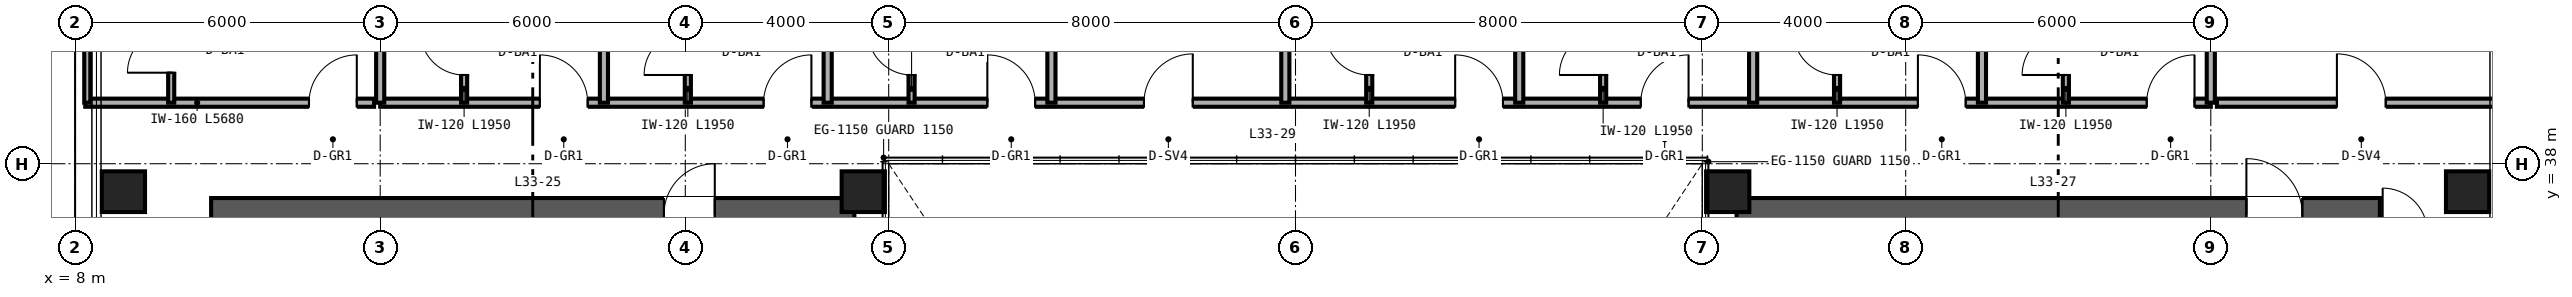
"""IFC4 building model, lengths in metres.
Left out: names, types, materials, properties, quantities, classifications, styles, units other than length and angle.
Written with IfcOpenShell. Run it as: python <this file> out.ifc"""

import sys

from ifc_helpers import new_model, si_unit, direction, frame, frame_2d, origin, origin_2d, place, context, subcontext, project, spatial, rectangle, hollow_rectangle, extrude, source, transform, mapped, element, fill, save


model = new_model("IFC4")
c1 = context("Model", 3, precision=1e-05, world=origin(), true_north=direction((0.0, 1.0)))
c2 = subcontext(c1, "Body", "Model", "MODEL_VIEW")
j1 = project(units=[si_unit("LENGTHUNIT", "METRE"), si_unit("PLANEANGLEUNIT", "RADIAN")], contexts=[c1])
p1 = place(None, origin())
s1 = spatial("IfcSite", under=j1, at=p1, CompositionType="ELEMENT")
p2 = place(p1, origin())
s2 = spatial("IfcBuilding", under=s1, at=p2, CompositionType="ELEMENT")
p3 = place(p2, frame((0.0, 0.0, 133.2)))
s3 = spatial("IfcBuildingStorey", under=s2, at=p3, CompositionType="ELEMENT", Elevation=133.2)
p4 = place(p3, frame((10.675, 37.0, 0.0), z_axis=(0.0, 0.0, 1.0), x_axis=(1.0, 0.0, 0.0)))
e1 = element("IfcWall", 1, at=p4, inside=s3, PredefinedType="SHEAR", context=c2, shape_type="SweptSolid", body=[
    extrude(rectangle(XDim=12.65, YDim=0.65, at=frame_2d((6.325, 0.0))), origin(), (0.0, 0.0, 1.0), 3.36),
])
p5 = place(p4, frame((8.905, 0.0, 0.0)))
e2 = element("IfcOpeningElement", 2, at=p5, cuts=e1, PredefinedType="OPENING", context=c2, shape_type="SweptSolid", body=[
    extrude(rectangle(XDim=1.0, YDim=2.15, at=frame_2d((0.5, 1.075))), frame((0.0, 0.335, 0.0), z_axis=(0.0, -1.0, 0.0), x_axis=(1.0, 0.0, 0.0)), (0.0, 0.0, 1.0), 0.67),
])
p6 = place(p3, frame((40.675, 37.0, 0.0), z_axis=(0.0, 0.0, 1.0), x_axis=(1.0, 0.0, 0.0)))
e3 = element("IfcWall", 3, at=p6, inside=s3, PredefinedType="SHEAR", context=c2, shape_type="SweptSolid", body=[
    extrude(rectangle(XDim=12.65, YDim=0.65, at=frame_2d((6.325, 0.0))), origin(), (0.0, 0.0, 1.0), 3.36),
])
p7 = place(p6, frame((10.025, 0.0, 0.0)))
e4 = element("IfcOpeningElement", 4, at=p7, cuts=e3, PredefinedType="OPENING", context=c2, shape_type="SweptSolid", body=[
    extrude(rectangle(XDim=1.1, YDim=2.15, at=frame_2d((0.55, 1.075))), frame((0.0, 0.335, 0.0), z_axis=(0.0, -1.0, 0.0), x_axis=(1.0, 0.0, 0.0)), (0.0, 0.0, 1.0), 0.67),
])
m1 = source(origin(), c2, "Body", "SweptSolid", [
    extrude(hollow_rectangle(XDim=0.85, YDim=0.8, WallThickness=0.032, at=origin_2d()), origin(), (0.0, 0.0, 1.0), 3.36),
])
for number, where, z_axis, x_axis in (
    (5, (8.95, 37.45, 0.0), (0.0, 0.0, 1.0), (1.0, 0.0, 0.0)),
    (6, (23.5, 37.45, 0.0), (0.0, 0.0, 1.0), (1.0, 0.0, 0.0)),
    (7, (40.5, 37.45, 0.0), (0.0, 0.0, 1.0), (1.0, 0.0, 0.0)),
    (8, (55.05, 37.45, 0.0), (0.0, 0.0, 1.0), (1.0, 0.0, 0.0)),
):
    element("IfcColumn", number, at=place(p3, frame(where, z_axis=z_axis, x_axis=x_axis)), inside=s3, PredefinedType="COLUMN", context=c2, shape_type="MappedRepresentation", body=[
        mapped(m1, transform((0.0, 0.0, 0.0), scale=1.0)),
    ])
p8 = place(p3, frame((8.2, 39.2, 0.0), z_axis=(0.0, 0.0, 1.0), x_axis=(1.0, 0.0, 0.0)))
e9 = element("IfcWall", 9, at=p8, inside=s3, PredefinedType="PARTITIONING", context=c2, shape_type="SweptSolid", body=[
    extrude(rectangle(XDim=5.68, YDim=0.16, at=frame_2d((2.84, 0.0))), origin(), (0.0, 0.0, 1.0), 3.36),
])
p9 = place(p8, frame((4.4, 0.0, 0.0)))
e10 = element("IfcOpeningElement", 10, at=p9, cuts=e9, PredefinedType="OPENING", context=c2, shape_type="SweptSolid", body=[
    extrude(rectangle(XDim=0.94, YDim=2.15, at=frame_2d((0.47, 1.075))), frame((0.0, 0.09, 0.0), z_axis=(0.0, -1.0, 0.0), x_axis=(1.0, 0.0, 0.0)), (0.0, 0.0, 1.0), 0.18),
])
p10 = place(p3, frame((9.89, 39.2, 0.0), z_axis=(0.0, 0.0, 1.0), x_axis=(0.0, 1.0, 0.0)))
e11 = element("IfcWall", 11, at=p10, inside=s3, PredefinedType="PARTITIONING", context=c2, shape_type="SweptSolid", body=[
    extrude(rectangle(XDim=2.04, YDim=0.12, at=frame_2d((1.02, 0.0))), origin(), (0.0, 0.0, 1.0), 3.36),
])
p11 = place(p10, frame((0.59, 0.0, 0.0)))
e12 = element("IfcOpeningElement", 12, at=p11, cuts=e11, PredefinedType="OPENING", context=c2, shape_type="SweptSolid", body=[
    extrude(rectangle(XDim=0.86, YDim=2.1, at=frame_2d((0.43, 1.05))), frame((0.0, 0.07, 0.0), z_axis=(0.0, -1.0, 0.0), x_axis=(1.0, 0.0, 0.0)), (0.0, 0.0, 1.0), 0.14),
])
p12 = place(p3, frame((8.24, 39.2, 0.0), z_axis=(0.0, 0.0, 1.0), x_axis=(0.0, 1.0, 0.0)))
e13 = element("IfcWall", 13, at=p12, inside=s3, PredefinedType="PARTITIONING", context=c2, shape_type="SweptSolid", body=[
    extrude(rectangle(XDim=2.04, YDim=0.12, at=frame_2d((1.02, 0.0))), origin(), (0.0, 0.0, 1.0), 3.36),
])
p13 = place(p3, frame((50.12, 39.2, 0.0), z_axis=(0.0, 0.0, 1.0), x_axis=(1.0, 0.0, 0.0)))
e14 = element("IfcWall", 14, at=p13, inside=s3, PredefinedType="PARTITIONING", context=c2, shape_type="SweptSolid", body=[
    extrude(rectangle(XDim=5.68, YDim=0.16, at=frame_2d((2.84, 0.0))), origin(), (0.0, 0.0, 1.0), 3.36),
])
p14 = place(p13, frame((2.36, 0.0, 0.0)))
e15 = element("IfcOpeningElement", 15, at=p14, cuts=e14, PredefinedType="OPENING", context=c2, shape_type="SweptSolid", body=[
    extrude(rectangle(XDim=0.96, YDim=2.15, at=frame_2d((0.48, 1.075))), frame((0.0, 0.09, 0.0), z_axis=(0.0, -1.0, 0.0), x_axis=(1.0, 0.0, 0.0)), (0.0, 0.0, 1.0), 0.18),
])
p15 = place(p3, frame((14.0, 39.2, 0.0), z_axis=(0.0, 0.0, 1.0), x_axis=(1.0, 0.0, 0.0)))
e16 = element("IfcWall", 16, at=p15, inside=s3, PredefinedType="PARTITIONING", context=c2, shape_type="SweptSolid", body=[
    extrude(rectangle(XDim=36.0, YDim=0.16, at=frame_2d((18.0, 0.0))), origin(), (0.0, 0.0, 1.0), 2.581),
])
p16 = place(p15, frame((3.14, 0.0, 0.0)))
e17 = element("IfcOpeningElement", 17, at=p16, cuts=e16, PredefinedType="OPENING", context=c2, shape_type="SweptSolid", body=[
    extrude(rectangle(XDim=0.94, YDim=2.15, at=frame_2d((0.47, 1.075))), frame((0.0, 0.09, 0.0), z_axis=(0.0, -1.0, 0.0), x_axis=(1.0, 0.0, 0.0)), (0.0, 0.0, 1.0), 0.18),
])
p17 = place(p15, frame((7.54, 0.0, 0.0)))
e18 = element("IfcOpeningElement", 18, at=p17, cuts=e16, PredefinedType="OPENING", context=c2, shape_type="SweptSolid", body=[
    extrude(rectangle(XDim=0.94, YDim=2.15, at=frame_2d((0.47, 1.075))), frame((0.0, 0.09, 0.0), z_axis=(0.0, -1.0, 0.0), x_axis=(1.0, 0.0, 0.0)), (0.0, 0.0, 1.0), 0.18),
])
p18 = place(p15, frame((11.94, 0.0, 0.0)))
e19 = element("IfcOpeningElement", 19, at=p18, cuts=e16, PredefinedType="OPENING", context=c2, shape_type="SweptSolid", body=[
    extrude(rectangle(XDim=0.94, YDim=2.15, at=frame_2d((0.47, 1.075))), frame((0.0, 0.09, 0.0), z_axis=(0.0, -1.0, 0.0), x_axis=(1.0, 0.0, 0.0)), (0.0, 0.0, 1.0), 0.18),
])
p19 = place(p15, frame((15.02, 0.0, 0.0)))
e20 = element("IfcOpeningElement", 20, at=p19, cuts=e16, PredefinedType="OPENING", context=c2, shape_type="SweptSolid", body=[
    extrude(rectangle(XDim=0.96, YDim=2.15, at=frame_2d((0.48, 1.075))), frame((0.0, 0.09, 0.0), z_axis=(0.0, -1.0, 0.0), x_axis=(1.0, 0.0, 0.0)), (0.0, 0.0, 1.0), 0.18),
])
p20 = place(p15, frame((21.14, 0.0, 0.0)))
e21 = element("IfcOpeningElement", 21, at=p20, cuts=e16, PredefinedType="OPENING", context=c2, shape_type="SweptSolid", body=[
    extrude(rectangle(XDim=0.94, YDim=2.15, at=frame_2d((0.47, 1.075))), frame((0.0, 0.09, 0.0), z_axis=(0.0, -1.0, 0.0), x_axis=(1.0, 0.0, 0.0)), (0.0, 0.0, 1.0), 0.18),
])
p21 = place(p15, frame((24.79, 0.0, 0.0)))
e22 = element("IfcOpeningElement", 22, at=p21, cuts=e16, PredefinedType="OPENING", context=c2, shape_type="SweptSolid", body=[
    extrude(rectangle(XDim=0.94, YDim=2.15, at=frame_2d((0.47, 1.075))), frame((0.0, 0.09, 0.0), z_axis=(0.0, -1.0, 0.0), x_axis=(1.0, 0.0, 0.0)), (0.0, 0.0, 1.0), 0.18),
])
p22 = place(p15, frame((30.24, 0.0, 0.0)))
e23 = element("IfcOpeningElement", 23, at=p22, cuts=e16, PredefinedType="OPENING", context=c2, shape_type="SweptSolid", body=[
    extrude(rectangle(XDim=0.94, YDim=2.15, at=frame_2d((0.47, 1.075))), frame((0.0, 0.09, 0.0), z_axis=(0.0, -1.0, 0.0), x_axis=(1.0, 0.0, 0.0)), (0.0, 0.0, 1.0), 0.18),
])
p23 = place(p15, frame((34.74, 0.0, 0.0)))
e24 = element("IfcOpeningElement", 24, at=p23, cuts=e16, PredefinedType="OPENING", context=c2, shape_type="SweptSolid", body=[
    extrude(rectangle(XDim=0.94, YDim=2.15, at=frame_2d((0.47, 1.075))), frame((0.0, 0.09, 0.0), z_axis=(0.0, -1.0, 0.0), x_axis=(1.0, 0.0, 0.0)), (0.0, 0.0, 1.0), 0.18),
])
for number, where, z_axis, x_axis in (
    (25, (14.0, 39.2, 0.0), (0.0, 0.0, 1.0), (0.0, 1.0, 0.0)),
    (26, (50.0, 39.2, 0.0), (0.0, 0.0, 1.0), (0.0, 1.0, 0.0)),
    (27, (18.4, 39.2, 0.0), (0.0, 0.0, 1.0), (0.0, 1.0, 0.0)),
):
    element("IfcWall", number, at=place(p3, frame(where, z_axis=z_axis, x_axis=x_axis)), inside=s3, PredefinedType="PARTITIONING", context=c2, shape_type="SweptSolid", body=[
        extrude(rectangle(XDim=10.44, YDim=0.16, at=frame_2d((5.22, 0.0))), origin(), (0.0, 0.0, 1.0), 2.667),
    ])
p24 = place(p3, frame((15.65, 39.2, 0.0), z_axis=(0.0, 0.0, 1.0), x_axis=(0.0, 1.0, 0.0)))
e28 = element("IfcWall", 28, at=p24, inside=s3, PredefinedType="PARTITIONING", context=c2, shape_type="SweptSolid", body=[
    extrude(rectangle(XDim=1.95, YDim=0.12, at=frame_2d((0.975, 0.0))), origin(), (0.0, 0.0, 1.0), 3.36),
])
p25 = place(p24, frame((0.545, 0.0, 0.0)))
e29 = element("IfcOpeningElement", 29, at=p25, cuts=e28, PredefinedType="OPENING", context=c2, shape_type="SweptSolid", body=[
    extrude(rectangle(XDim=0.86, YDim=2.1, at=frame_2d((0.43, 1.05))), frame((0.0, 0.07, 0.0), z_axis=(0.0, -1.0, 0.0), x_axis=(1.0, 0.0, 0.0)), (0.0, 0.0, 1.0), 0.14),
])
p26 = place(p3, frame((22.8, 39.2, 0.0), z_axis=(0.0, 0.0, 1.0), x_axis=(0.0, 1.0, 0.0)))
e30 = element("IfcWall", 30, at=p26, inside=s3, PredefinedType="PARTITIONING", context=c2, shape_type="SweptSolid", body=[
    extrude(rectangle(XDim=10.44, YDim=0.16, at=frame_2d((5.22, 0.0))), origin(), (0.0, 0.0, 1.0), 2.823),
])
p27 = place(p3, frame((20.05, 39.2, 0.0), z_axis=(0.0, 0.0, 1.0), x_axis=(0.0, 1.0, 0.0)))
e31 = element("IfcWall", 31, at=p27, inside=s3, PredefinedType="PARTITIONING", context=c2, shape_type="SweptSolid", body=[
    extrude(rectangle(XDim=1.95, YDim=0.12, at=frame_2d((0.975, 0.0))), origin(), (0.0, 0.0, 1.0), 3.36),
])
p28 = place(p27, frame((0.545, 0.0, 0.0)))
e32 = element("IfcOpeningElement", 32, at=p28, cuts=e31, PredefinedType="OPENING", context=c2, shape_type="SweptSolid", body=[
    extrude(rectangle(XDim=0.86, YDim=2.1, at=frame_2d((0.43, 1.05))), frame((0.0, 0.07, 0.0), z_axis=(0.0, -1.0, 0.0), x_axis=(1.0, 0.0, 0.0)), (0.0, 0.0, 1.0), 0.14),
])
p29 = place(p3, frame((27.2, 39.2, 0.0), z_axis=(0.0, 0.0, 1.0), x_axis=(0.0, 1.0, 0.0)))
e33 = element("IfcWall", 33, at=p29, inside=s3, PredefinedType="PARTITIONING", context=c2, shape_type="SweptSolid", body=[
    extrude(rectangle(XDim=10.44, YDim=0.16, at=frame_2d((5.22, 0.0))), origin(), (0.0, 0.0, 1.0), 2.433),
])
p30 = place(p3, frame((24.45, 39.2, 0.0), z_axis=(0.0, 0.0, 1.0), x_axis=(0.0, 1.0, 0.0)))
e34 = element("IfcWall", 34, at=p30, inside=s3, PredefinedType="PARTITIONING", context=c2, shape_type="SweptSolid", body=[
    extrude(rectangle(XDim=1.95, YDim=0.12, at=frame_2d((0.975, 0.0))), origin(), (0.0, 0.0, 1.0), 3.36),
])
p31 = place(p30, frame((0.545, 0.0, 0.0)))
e35 = element("IfcOpeningElement", 35, at=p31, cuts=e34, PredefinedType="OPENING", context=c2, shape_type="SweptSolid", body=[
    extrude(rectangle(XDim=0.86, YDim=2.1, at=frame_2d((0.43, 1.05))), frame((0.0, 0.07, 0.0), z_axis=(0.0, -1.0, 0.0), x_axis=(1.0, 0.0, 0.0)), (0.0, 0.0, 1.0), 0.14),
])
for number, where, z_axis, x_axis in (
    (36, (31.8, 39.2, 0.0), (0.0, 0.0, 1.0), (0.0, 1.0, 0.0)),
    (37, (36.4, 39.2, 0.0), (0.0, 0.0, 1.0), (0.0, 1.0, 0.0)),
):
    element("IfcWall", number, at=place(p3, frame(where, z_axis=z_axis, x_axis=x_axis)), inside=s3, PredefinedType="PARTITIONING", context=c2, shape_type="SweptSolid", body=[
        extrude(rectangle(XDim=10.44, YDim=0.16, at=frame_2d((5.22, 0.0))), origin(), (0.0, 0.0, 1.0), 2.433),
    ])
p32 = place(p3, frame((33.45, 39.2, 0.0), z_axis=(0.0, 0.0, 1.0), x_axis=(0.0, 1.0, 0.0)))
e38 = element("IfcWall", 38, at=p32, inside=s3, PredefinedType="PARTITIONING", context=c2, shape_type="SweptSolid", body=[
    extrude(rectangle(XDim=1.95, YDim=0.12, at=frame_2d((0.975, 0.0))), origin(), (0.0, 0.0, 1.0), 3.36),
])
p33 = place(p32, frame((0.545, 0.0, 0.0)))
e39 = element("IfcOpeningElement", 39, at=p33, cuts=e38, PredefinedType="OPENING", context=c2, shape_type="SweptSolid", body=[
    extrude(rectangle(XDim=0.86, YDim=2.1, at=frame_2d((0.43, 1.05))), frame((0.0, 0.07, 0.0), z_axis=(0.0, -1.0, 0.0), x_axis=(1.0, 0.0, 0.0)), (0.0, 0.0, 1.0), 0.14),
])
p34 = place(p3, frame((41.0, 39.2, 0.0), z_axis=(0.0, 0.0, 1.0), x_axis=(0.0, 1.0, 0.0)))
e40 = element("IfcWall", 40, at=p34, inside=s3, PredefinedType="PARTITIONING", context=c2, shape_type="SweptSolid", body=[
    extrude(rectangle(XDim=10.44, YDim=0.16, at=frame_2d((5.22, 0.0))), origin(), (0.0, 0.0, 1.0), 2.823),
])
p35 = place(p3, frame((38.05, 39.2, 0.0), z_axis=(0.0, 0.0, 1.0), x_axis=(0.0, 1.0, 0.0)))
e41 = element("IfcWall", 41, at=p35, inside=s3, PredefinedType="PARTITIONING", context=c2, shape_type="SweptSolid", body=[
    extrude(rectangle(XDim=1.95, YDim=0.12, at=frame_2d((0.975, 0.0))), origin(), (0.0, 0.0, 1.0), 3.36),
])
p36 = place(p35, frame((0.545, 0.0, 0.0)))
e42 = element("IfcOpeningElement", 42, at=p36, cuts=e41, PredefinedType="OPENING", context=c2, shape_type="SweptSolid", body=[
    extrude(rectangle(XDim=0.86, YDim=2.1, at=frame_2d((0.43, 1.05))), frame((0.0, 0.07, 0.0), z_axis=(0.0, -1.0, 0.0), x_axis=(1.0, 0.0, 0.0)), (0.0, 0.0, 1.0), 0.14),
])
p37 = place(p3, frame((45.5, 39.2, 0.0), z_axis=(0.0, 0.0, 1.0), x_axis=(0.0, 1.0, 0.0)))
e43 = element("IfcWall", 43, at=p37, inside=s3, PredefinedType="PARTITIONING", context=c2, shape_type="SweptSolid", body=[
    extrude(rectangle(XDim=10.44, YDim=0.16, at=frame_2d((5.22, 0.0))), origin(), (0.0, 0.0, 1.0), 2.667),
])
p38 = place(p3, frame((42.65, 39.2, 0.0), z_axis=(0.0, 0.0, 1.0), x_axis=(0.0, 1.0, 0.0)))
e44 = element("IfcWall", 44, at=p38, inside=s3, PredefinedType="PARTITIONING", context=c2, shape_type="SweptSolid", body=[
    extrude(rectangle(XDim=1.95, YDim=0.12, at=frame_2d((0.975, 0.0))), origin(), (0.0, 0.0, 1.0), 3.36),
])
p39 = place(p38, frame((0.545, 0.0, 0.0)))
e45 = element("IfcOpeningElement", 45, at=p39, cuts=e44, PredefinedType="OPENING", context=c2, shape_type="SweptSolid", body=[
    extrude(rectangle(XDim=0.86, YDim=2.1, at=frame_2d((0.43, 1.05))), frame((0.0, 0.07, 0.0), z_axis=(0.0, -1.0, 0.0), x_axis=(1.0, 0.0, 0.0)), (0.0, 0.0, 1.0), 0.14),
])
p40 = place(p3, frame((47.15, 39.2, 0.0), z_axis=(0.0, 0.0, 1.0), x_axis=(0.0, 1.0, 0.0)))
e46 = element("IfcWall", 46, at=p40, inside=s3, PredefinedType="PARTITIONING", context=c2, shape_type="SweptSolid", body=[
    extrude(rectangle(XDim=1.95, YDim=0.12, at=frame_2d((0.975, 0.0))), origin(), (0.0, 0.0, 1.0), 3.36),
])
p41 = place(p40, frame((0.545, 0.0, 0.0)))
e47 = element("IfcOpeningElement", 47, at=p41, cuts=e46, PredefinedType="OPENING", context=c2, shape_type="SweptSolid", body=[
    extrude(rectangle(XDim=0.86, YDim=2.1, at=frame_2d((0.43, 1.05))), frame((0.0, 0.07, 0.0), z_axis=(0.0, -1.0, 0.0), x_axis=(1.0, 0.0, 0.0)), (0.0, 0.0, 1.0), 0.14),
])
m2 = source(origin(), c2, "Body", "SweptSolid", [
    extrude(rectangle(XDim=1.0, YDim=2.15, at=frame_2d((0.5, 1.075))), frame((0.0, 0.025, 0.0), z_axis=(0.0, -1.0, 0.0), x_axis=(1.0, 0.0, 0.0)), (0.0, 0.0, 1.0), 0.05),
])
p42 = place(p5, origin())
e48 = element("IfcDoor", 48, at=p42, inside=s3, OperationType="SINGLE_SWING_RIGHT", PredefinedType="DOOR", context=c2, shape_type="MappedRepresentation", body=[
    mapped(m2, transform((0.0, 0.0, 0.0), scale=1.0)),
])
fill(e2, e48)
m3 = source(origin(), c2, "Body", "SweptSolid", [
    extrude(rectangle(XDim=1.1, YDim=2.15, at=frame_2d((0.55, 1.075))), frame((0.0, 0.025, 0.0), z_axis=(0.0, -1.0, 0.0), x_axis=(1.0, 0.0, 0.0)), (0.0, 0.0, 1.0), 0.05),
])
p43 = place(p7, origin())
e49 = element("IfcDoor", 49, at=p43, inside=s3, OperationType="SINGLE_SWING_LEFT", PredefinedType="DOOR", context=c2, shape_type="MappedRepresentation", body=[
    mapped(m3, transform((0.0, 0.0, 0.0), scale=1.0)),
])
fill(e4, e49)
m4 = source(origin(), c2, "Body", "SweptSolid", [
    extrude(rectangle(XDim=0.86, YDim=2.1, at=frame_2d((0.43, 1.05))), frame((0.0, 0.025, 0.0), z_axis=(0.0, -1.0, 0.0), x_axis=(1.0, 0.0, 0.0)), (0.0, 0.0, 1.0), 0.05),
])
p44 = place(p11, origin())
e50 = element("IfcDoor", 50, at=p44, inside=s3, OperationType="SINGLE_SWING_LEFT", PredefinedType="DOOR", context=c2, shape_type="MappedRepresentation", body=[
    mapped(m4, transform((0.0, 0.0, 0.0), scale=1.0)),
])
fill(e12, e50)
m5 = source(origin(), c2, "Body", "SweptSolid", [
    extrude(rectangle(XDim=0.94, YDim=2.15, at=frame_2d((0.47, 1.075))), frame((0.0, 0.025, 0.0), z_axis=(0.0, -1.0, 0.0), x_axis=(1.0, 0.0, 0.0)), (0.0, 0.0, 1.0), 0.05),
])
p45 = place(p9, origin())
e51 = element("IfcDoor", 51, at=p45, inside=s3, OperationType="SINGLE_SWING_RIGHT", PredefinedType="DOOR", context=c2, shape_type="MappedRepresentation", body=[
    mapped(m5, transform((0.0, 0.0, 0.0), scale=1.0)),
])
fill(e10, e51)
m6 = source(origin(), c2, "Body", "SweptSolid", [
    extrude(rectangle(XDim=0.96, YDim=2.15, at=frame_2d((0.48, 1.075))), frame((0.0, 0.025, 0.0), z_axis=(0.0, -1.0, 0.0), x_axis=(1.0, 0.0, 0.0)), (0.0, 0.0, 1.0), 0.05),
])
p46 = place(p14, origin())
e52 = element("IfcDoor", 52, at=p46, inside=s3, OperationType="SINGLE_SWING_LEFT", PredefinedType="DOOR", context=c2, shape_type="MappedRepresentation", body=[
    mapped(m6, transform((0.0, 0.0, 0.0), scale=1.0)),
])
fill(e15, e52)
p47 = place(p25, origin())
e53 = element("IfcDoor", 53, at=p47, inside=s3, OperationType="SINGLE_SWING_RIGHT", PredefinedType="DOOR", context=c2, shape_type="MappedRepresentation", body=[
    mapped(m4, transform((0.0, 0.0, 0.0), scale=1.0)),
])
fill(e29, e53)
p48 = place(p28, origin())
e54 = element("IfcDoor", 54, at=p48, inside=s3, OperationType="SINGLE_SWING_LEFT", PredefinedType="DOOR", context=c2, shape_type="MappedRepresentation", body=[
    mapped(m4, transform((0.0, 0.0, 0.0), scale=1.0)),
])
fill(e32, e54)
p49 = place(p31, origin())
e55 = element("IfcDoor", 55, at=p49, inside=s3, OperationType="SINGLE_SWING_RIGHT", PredefinedType="DOOR", context=c2, shape_type="MappedRepresentation", body=[
    mapped(m4, transform((0.0, 0.0, 0.0), scale=1.0)),
])
fill(e35, e55)
p50 = place(p33, origin())
e56 = element("IfcDoor", 56, at=p50, inside=s3, OperationType="SINGLE_SWING_RIGHT", PredefinedType="DOOR", context=c2, shape_type="MappedRepresentation", body=[
    mapped(m4, transform((0.0, 0.0, 0.0), scale=1.0)),
])
fill(e39, e56)
p51 = place(p36, origin())
e57 = element("IfcDoor", 57, at=p51, inside=s3, OperationType="SINGLE_SWING_LEFT", PredefinedType="DOOR", context=c2, shape_type="MappedRepresentation", body=[
    mapped(m4, transform((0.0, 0.0, 0.0), scale=1.0)),
])
fill(e42, e57)
p52 = place(p39, origin())
e58 = element("IfcDoor", 58, at=p52, inside=s3, OperationType="SINGLE_SWING_RIGHT", PredefinedType="DOOR", context=c2, shape_type="MappedRepresentation", body=[
    mapped(m4, transform((0.0, 0.0, 0.0), scale=1.0)),
])
fill(e45, e58)
p53 = place(p41, origin())
e59 = element("IfcDoor", 59, at=p53, inside=s3, OperationType="SINGLE_SWING_LEFT", PredefinedType="DOOR", context=c2, shape_type="MappedRepresentation", body=[
    mapped(m4, transform((0.0, 0.0, 0.0), scale=1.0)),
])
fill(e47, e59)
p54 = place(p16, origin())
e60 = element("IfcDoor", 60, at=p54, inside=s3, OperationType="SINGLE_SWING_LEFT", PredefinedType="DOOR", context=c2, shape_type="MappedRepresentation", body=[
    mapped(m5, transform((0.0, 0.0, 0.0), scale=1.0)),
])
fill(e17, e60)
p55 = place(p17, origin())
e61 = element("IfcDoor", 61, at=p55, inside=s3, OperationType="SINGLE_SWING_RIGHT", PredefinedType="DOOR", context=c2, shape_type="MappedRepresentation", body=[
    mapped(m5, transform((0.0, 0.0, 0.0), scale=1.0)),
])
fill(e18, e61)
p56 = place(p18, origin())
e62 = element("IfcDoor", 62, at=p56, inside=s3, OperationType="SINGLE_SWING_LEFT", PredefinedType="DOOR", context=c2, shape_type="MappedRepresentation", body=[
    mapped(m5, transform((0.0, 0.0, 0.0), scale=1.0)),
])
fill(e19, e62)
p57 = place(p19, origin())
e63 = element("IfcDoor", 63, at=p57, inside=s3, OperationType="SINGLE_SWING_RIGHT", PredefinedType="DOOR", context=c2, shape_type="MappedRepresentation", body=[
    mapped(m6, transform((0.0, 0.0, 0.0), scale=1.0)),
])
fill(e20, e63)
p58 = place(p20, origin())
e64 = element("IfcDoor", 64, at=p58, inside=s3, OperationType="SINGLE_SWING_LEFT", PredefinedType="DOOR", context=c2, shape_type="MappedRepresentation", body=[
    mapped(m5, transform((0.0, 0.0, 0.0), scale=1.0)),
])
fill(e21, e64)
p59 = place(p21, origin())
e65 = element("IfcDoor", 65, at=p59, inside=s3, OperationType="SINGLE_SWING_RIGHT", PredefinedType="DOOR", context=c2, shape_type="MappedRepresentation", body=[
    mapped(m5, transform((0.0, 0.0, 0.0), scale=1.0)),
])
fill(e22, e65)
p60 = place(p22, origin())
e66 = element("IfcDoor", 66, at=p60, inside=s3, OperationType="SINGLE_SWING_LEFT", PredefinedType="DOOR", context=c2, shape_type="MappedRepresentation", body=[
    mapped(m5, transform((0.0, 0.0, 0.0), scale=1.0)),
])
fill(e23, e66)
p61 = place(p23, origin())
e67 = element("IfcDoor", 67, at=p61, inside=s3, OperationType="SINGLE_SWING_RIGHT", PredefinedType="DOOR", context=c2, shape_type="MappedRepresentation", body=[
    mapped(m5, transform((0.0, 0.0, 0.0), scale=1.0)),
])
fill(e24, e67)
save(model, sys.argv[1])
